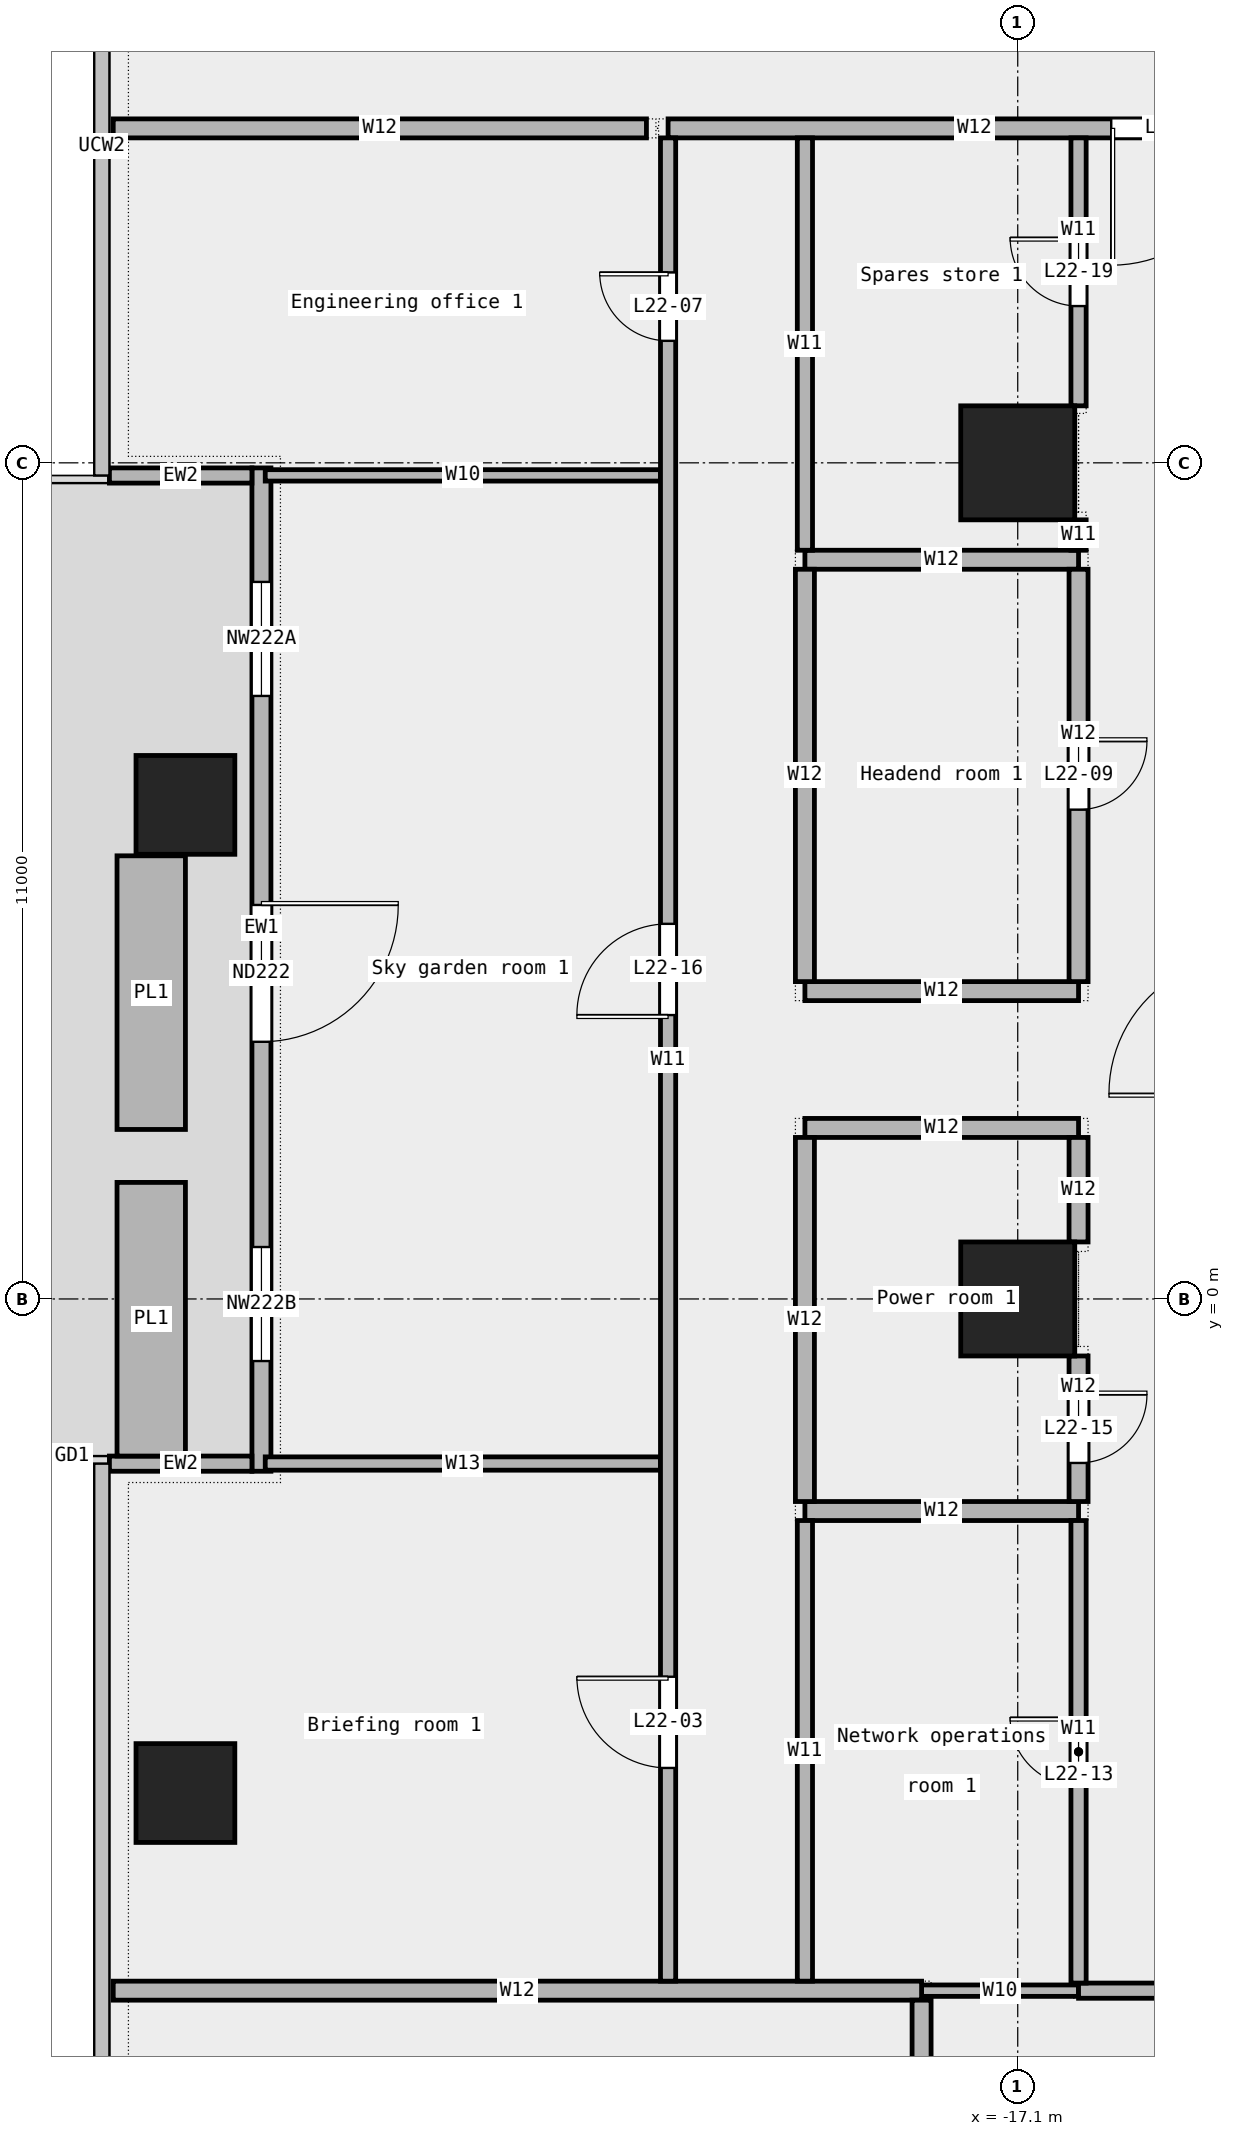
"""IFC4 building model, lengths in metres.
Left out: names, types, materials, properties, quantities, classifications, styles, units other than length and angle.
Written with IfcOpenShell. Run it as: python <this file> out.ifc"""

import sys

from ifc_helpers import new_model, si_unit, direction, frame, frame_2d, origin, origin_2d, place, context, subcontext, project, spatial, rectangle, extrude, element, fill, save


model = new_model("IFC4")
c1 = context("Model", 3, precision=1e-05, world=origin(), true_north=direction((0.0, 1.0)))
c2 = subcontext(c1, "Body", "Model", "MODEL_VIEW")
j1 = project(units=[si_unit("LENGTHUNIT", "METRE"), si_unit("PLANEANGLEUNIT", "RADIAN")], contexts=[c1])
p1 = place(None, origin())
s1 = spatial("IfcSite", under=j1, at=p1, CompositionType="ELEMENT")
p2 = place(p1, origin())
s2 = spatial("IfcBuilding", under=s1, at=p2, CompositionType="ELEMENT")
p3 = place(p2, frame((0.0, 0.0, 112.6)))
s3 = spatial("IfcBuildingStorey", under=s2, at=p3, CompositionType="ELEMENT", Elevation=112.6)
for number, where, z_axis, x_axis in (
    (1, (-28.05, 6.5, 0.0), (0.0, 0.0, 1.0), (1.0, 0.0, 0.0)),
    (2, (-28.05, -6.5, 0.0), (0.0, 0.0, 1.0), (1.0, 0.0, 0.0)),
):
    element("IfcColumn", number, at=place(p3, frame(where, z_axis=z_axis, x_axis=x_axis)), inside=s3, PredefinedType="COLUMN", context=c2, shape_type="SweptSolid", body=[
        extrude(rectangle(XDim=1.3, YDim=1.3, at=origin_2d()), origin(), (0.0, 0.0, 1.0), 4.05),
    ])
for number, where, z_axis, x_axis in (
    (3, (-17.1, 0.0, 0.0), (0.0, 0.0, 1.0), (1.0, 0.0, 0.0)),
    (4, (-17.1, 11.0, 0.0), (0.0, 0.0, 1.0), (1.0, 0.0, 0.0)),
):
    element("IfcColumn", number, at=place(p3, frame(where, z_axis=z_axis, x_axis=x_axis)), inside=s3, PredefinedType="COLUMN", context=c2, shape_type="SweptSolid", body=[
        extrude(rectangle(XDim=1.5, YDim=1.5, at=origin_2d()), origin(), (0.0, 0.0, 1.0), 4.05),
    ])
p4 = place(p3, frame((-27.05, 10.933, 0.0), z_axis=(0.0, 0.0, 1.0), x_axis=(0.0, -1.0, 0.0)))
e5 = element("IfcWall", 5, at=p4, inside=s3, PredefinedType="STANDARD", context=c2, shape_type="SweptSolid", body=[
    extrude(rectangle(XDim=13.2, YDim=0.25, at=frame_2d((6.6, 0.0))), origin(), (0.0, 0.0, 1.0), 4.05),
])
p5 = place(p4, frame((1.5, 0.0, 0.45)))
e6 = element("IfcOpeningElement", 6, at=p5, cuts=e5, PredefinedType="OPENING", context=c2, shape_type="SweptSolid", body=[
    extrude(rectangle(XDim=1.5, YDim=3.0, at=frame_2d((0.75, 1.5))), frame((0.0, 0.137, 0.0), z_axis=(0.0, -1.0, 0.0), x_axis=(1.0, 0.0, 0.0)), (0.0, 0.0, 1.0), 0.274),
])
p6 = place(p4, frame((5.75, 0.0, 0.0)))
e7 = element("IfcOpeningElement", 7, at=p6, cuts=e5, PredefinedType="OPENING", context=c2, shape_type="SweptSolid", body=[
    extrude(rectangle(XDim=1.8, YDim=2.4, at=frame_2d((0.9, 1.2))), frame((0.0, 0.137, 0.0), z_axis=(0.0, -1.0, 0.0), x_axis=(1.0, 0.0, 0.0)), (0.0, 0.0, 1.0), 0.274),
])
p7 = place(p4, frame((10.25, 0.0, 0.45)))
e8 = element("IfcOpeningElement", 8, at=p7, cuts=e5, PredefinedType="OPENING", context=c2, shape_type="SweptSolid", body=[
    extrude(rectangle(XDim=1.5, YDim=3.0, at=frame_2d((0.75, 1.5))), frame((0.0, 0.137, 0.0), z_axis=(0.0, -1.0, 0.0), x_axis=(1.0, 0.0, 0.0)), (0.0, 0.0, 1.0), 0.274),
])
for number, where, z_axis, x_axis in (
    (9, (-29.05, 10.833, 0.0), (0.0, 0.0, 1.0), (1.0, 0.0, 0.0)),
    (10, (-29.05, -2.167, 0.0), (0.0, 0.0, 1.0), (1.0, 0.0, 0.0)),
):
    element("IfcWall", number, at=place(p3, frame(where, z_axis=z_axis, x_axis=x_axis)), inside=s3, PredefinedType="STANDARD", context=c2, shape_type="SweptSolid", body=[
        extrude(rectangle(XDim=1.875, YDim=0.2, at=frame_2d((0.938, 0.0))), origin(), (0.0, 0.0, 1.0), 4.05),
    ])
for number, where, z_axis, x_axis in (
    (11, (-28.5, 5.83, 0.0), (0.0, 0.0, 1.0), (0.0, -1.0, 0.0)),
    (12, (-28.5, 1.533, 0.0), (0.0, 0.0, 1.0), (0.0, -1.0, 0.0)),
):
    element("IfcWall", number, at=place(p3, frame(where, z_axis=z_axis, x_axis=x_axis)), inside=s3, PredefinedType="STANDARD", context=c2, shape_type="SweptSolid", body=[
        extrude(rectangle(XDim=3.6, YDim=0.9, at=frame_2d((1.8, 0.0))), origin(), (0.0, 0.0, 1.0), 0.7),
    ])
p8 = place(p3, frame((-18.365, -9.1, 0.0), z_axis=(0.0, 0.0, 1.0), x_axis=(1.0, 0.0, 0.0)))
e13 = element("IfcWall", 13, at=p8, inside=s3, PredefinedType="PARTITIONING", context=c2, shape_type="SweptSolid", body=[
    extrude(rectangle(XDim=2.065, YDim=0.15, at=frame_2d((1.032, 0.0))), origin(), (0.0, 0.0, 1.0), 4.05),
])
p9 = place(p3, frame((-16.3, -9.1, 0.0), z_axis=(0.0, 0.0, 1.0), x_axis=(1.0, 0.0, 0.0)))
e14 = element("IfcWall", 14, at=p9, inside=s3, PredefinedType="PARTITIONING", context=c2, shape_type="SweptSolid", body=[
    extrude(rectangle(XDim=5.03, YDim=0.2, at=frame_2d((2.515, 0.0))), origin(), (0.0, 0.0, 1.0), 4.05),
])
p10 = place(p3, frame((-29.0, -9.1, 0.0), z_axis=(0.0, 0.0, 1.0), x_axis=(1.0, 0.0, 0.0)))
e15 = element("IfcWall", 15, at=p10, inside=s3, PredefinedType="PARTITIONING", context=c2, shape_type="SweptSolid", body=[
    extrude(rectangle(XDim=10.635, YDim=0.25, at=frame_2d((5.317, 0.0))), origin(), (0.0, 0.0, 1.0), 4.05),
])
p11 = place(p3, frame((-19.9, -2.79, 0.0), z_axis=(0.0, 0.0, 1.0), x_axis=(1.0, 0.0, 0.0)))
e16 = element("IfcWall", 16, at=p11, inside=s3, PredefinedType="PARTITIONING", context=c2, shape_type="SweptSolid", body=[
    extrude(rectangle(XDim=3.6, YDim=0.25, at=frame_2d((1.8, 0.0))), origin(), (0.0, 0.0, 1.0), 4.05),
])
p12 = place(p3, frame((-27.0, -2.165, 0.0), z_axis=(0.0, 0.0, 1.0), x_axis=(1.0, 0.0, 0.0)))
e17 = element("IfcWall", 17, at=p12, inside=s3, PredefinedType="PARTITIONING", context=c2, shape_type="SweptSolid", body=[
    extrude(rectangle(XDim=5.2, YDim=0.175, at=frame_2d((2.6, 0.0))), origin(), (0.0, 0.0, 1.0), 4.05),
])
for number, where, z_axis, x_axis in (
    (18, (-19.9, 2.25, 0.0), (0.0, 0.0, 1.0), (1.0, 0.0, 0.0)),
    (19, (-19.9, 4.05, 0.0), (0.0, 0.0, 1.0), (1.0, 0.0, 0.0)),
    (20, (-19.9, 9.725, 0.0), (0.0, 0.0, 1.0), (1.0, 0.0, 0.0)),
):
    element("IfcWall", number, at=place(p3, frame(where, z_axis=z_axis, x_axis=x_axis)), inside=s3, PredefinedType="PARTITIONING", context=c2, shape_type="SweptSolid", body=[
        extrude(rectangle(XDim=3.6, YDim=0.25, at=frame_2d((1.8, 0.0))), origin(), (0.0, 0.0, 1.0), 4.05),
    ])
p13 = place(p3, frame((-27.0, 10.835, 0.0), z_axis=(0.0, 0.0, 1.0), x_axis=(1.0, 0.0, 0.0)))
e21 = element("IfcWall", 21, at=p13, inside=s3, PredefinedType="PARTITIONING", context=c2, shape_type="SweptSolid", body=[
    extrude(rectangle(XDim=5.2, YDim=0.15, at=frame_2d((2.6, 0.0))), origin(), (0.0, 0.0, 1.0), 4.05),
])
p14 = place(p3, frame((-29.0, 15.4, 0.0), z_axis=(0.0, 0.0, 1.0), x_axis=(1.0, 0.0, 0.0)))
e22 = element("IfcWall", 22, at=p14, inside=s3, PredefinedType="PARTITIONING", context=c2, shape_type="SweptSolid", body=[
    extrude(rectangle(XDim=7.015, YDim=0.25, at=frame_2d((3.507, 0.0))), origin(), (0.0, 0.0, 1.0), 4.05),
])
p15 = place(p3, frame((-21.7, 15.4, 0.0), z_axis=(0.0, 0.0, 1.0), x_axis=(1.0, 0.0, 0.0)))
e23 = element("IfcWall", 23, at=p15, inside=s3, PredefinedType="PARTITIONING", context=c2, shape_type="SweptSolid", body=[
    extrude(rectangle(XDim=8.06, YDim=0.25, at=frame_2d((4.03, 0.0))), origin(), (0.0, 0.0, 1.0), 4.05),
])
p16 = place(p15, frame((5.83, 0.0, 0.0)))
e24 = element("IfcOpeningElement", 24, at=p16, cuts=e23, PredefinedType="OPENING", context=c2, shape_type="SweptSolid", body=[
    extrude(rectangle(XDim=1.8, YDim=2.1, at=frame_2d((0.9, 1.05))), frame((0.0, 0.137, 0.0), z_axis=(0.0, -1.0, 0.0), x_axis=(1.0, 0.0, 0.0)), (0.0, 0.0, 1.0), 0.274),
])
p17 = place(p3, frame((-21.7, -8.975, 0.0), z_axis=(0.0, 0.0, 1.0), x_axis=(0.0, 1.0, 0.0)))
e25 = element("IfcWall", 25, at=p17, inside=s3, PredefinedType="PARTITIONING", context=c2, shape_type="SweptSolid", body=[
    extrude(rectangle(XDim=24.25, YDim=0.2, at=frame_2d((12.125, 0.0))), origin(), (0.0, 0.0, 1.0), 4.05),
])
p18 = place(p17, frame((2.805, 0.0, 0.0)))
e26 = element("IfcOpeningElement", 26, at=p18, cuts=e25, PredefinedType="OPENING", context=c2, shape_type="SweptSolid", body=[
    extrude(rectangle(XDim=1.2, YDim=2.1, at=frame_2d((0.6, 1.05))), frame((0.0, 0.112, 0.0), z_axis=(0.0, -1.0, 0.0), x_axis=(1.0, 0.0, 0.0)), (0.0, 0.0, 1.0), 0.224),
])
p19 = place(p17, frame((21.58, 0.0, 0.0)))
e27 = element("IfcOpeningElement", 27, at=p19, cuts=e25, PredefinedType="OPENING", context=c2, shape_type="SweptSolid", body=[
    extrude(rectangle(XDim=0.9, YDim=2.1, at=frame_2d((0.45, 1.05))), frame((0.0, 0.112, 0.0), z_axis=(0.0, -1.0, 0.0), x_axis=(1.0, 0.0, 0.0)), (0.0, 0.0, 1.0), 0.224),
])
p20 = place(p17, frame((12.71, 0.0, 0.0)))
e28 = element("IfcOpeningElement", 28, at=p20, cuts=e25, PredefinedType="OPENING", context=c2, shape_type="SweptSolid", body=[
    extrude(rectangle(XDim=1.2, YDim=2.1, at=frame_2d((0.6, 1.05))), frame((0.0, 0.112, 0.0), z_axis=(0.0, -1.0, 0.0), x_axis=(1.0, 0.0, 0.0)), (0.0, 0.0, 1.0), 0.224),
])
p21 = place(p3, frame((-19.9, -8.975, 0.0), z_axis=(0.0, 0.0, 1.0), x_axis=(0.0, 1.0, 0.0)))
e29 = element("IfcWall", 29, at=p21, inside=s3, PredefinedType="PARTITIONING", context=c2, shape_type="SweptSolid", body=[
    extrude(rectangle(XDim=6.06, YDim=0.2, at=frame_2d((3.03, 0.0))), origin(), (0.0, 0.0, 1.0), 4.05),
])
p22 = place(p3, frame((-19.9, 9.85, 0.0), z_axis=(0.0, 0.0, 1.0), x_axis=(0.0, 1.0, 0.0)))
e30 = element("IfcWall", 30, at=p22, inside=s3, PredefinedType="PARTITIONING", context=c2, shape_type="SweptSolid", body=[
    extrude(rectangle(XDim=5.425, YDim=0.2, at=frame_2d((2.712, 0.0))), origin(), (0.0, 0.0, 1.0), 4.05),
])
p23 = place(p3, frame((-19.9, -2.665, 0.0), z_axis=(0.0, 0.0, 1.0), x_axis=(0.0, 1.0, 0.0)))
e31 = element("IfcWall", 31, at=p23, inside=s3, PredefinedType="PARTITIONING", context=c2, shape_type="SweptSolid", body=[
    extrude(rectangle(XDim=4.79, YDim=0.25, at=frame_2d((2.395, 0.0))), origin(), (0.0, 0.0, 1.0), 4.05),
])
p24 = place(p3, frame((-19.9, 4.175, 0.0), z_axis=(0.0, 0.0, 1.0), x_axis=(0.0, 1.0, 0.0)))
e32 = element("IfcWall", 32, at=p24, inside=s3, PredefinedType="PARTITIONING", context=c2, shape_type="SweptSolid", body=[
    extrude(rectangle(XDim=5.425, YDim=0.25, at=frame_2d((2.712, 0.0))), origin(), (0.0, 0.0, 1.0), 4.05),
])
p25 = place(p3, frame((-18.365, -14.825, 0.0), z_axis=(0.0, 0.0, 1.0), x_axis=(0.0, 1.0, 0.0)))
e33 = element("IfcWall", 33, at=p25, inside=s3, PredefinedType="PARTITIONING", context=c2, shape_type="SweptSolid", body=[
    extrude(rectangle(XDim=5.6, YDim=0.25, at=frame_2d((2.8, 0.0))), origin(), (0.0, 0.0, 1.0), 4.05),
])
p26 = place(p3, frame((-16.3, -9.0, 0.0), z_axis=(0.0, 0.0, 1.0), x_axis=(0.0, 1.0, 0.0)))
e34 = element("IfcWall", 34, at=p26, inside=s3, PredefinedType="PARTITIONING", context=c2, shape_type="SweptSolid", body=[
    extrude(rectangle(XDim=6.085, YDim=0.2, at=frame_2d((3.042, 0.0))), origin(), (0.0, 0.0, 1.0), 4.05),
])
p27 = place(p26, frame((2.593, 0.0, 0.0)))
e35 = element("IfcOpeningElement", 35, at=p27, cuts=e34, PredefinedType="OPENING", context=c2, shape_type="SweptSolid", body=[
    extrude(rectangle(XDim=0.9, YDim=2.1, at=frame_2d((0.45, 1.05))), frame((0.0, 0.112, 0.0), z_axis=(0.0, -1.0, 0.0), x_axis=(1.0, 0.0, 0.0)), (0.0, 0.0, 1.0), 0.224),
])
p28 = place(p3, frame((-16.3, 9.85, 0.0), z_axis=(0.0, 0.0, 1.0), x_axis=(0.0, 1.0, 0.0)))
e36 = element("IfcWall", 36, at=p28, inside=s3, PredefinedType="PARTITIONING", context=c2, shape_type="SweptSolid", body=[
    extrude(rectangle(XDim=0.4, YDim=0.2, at=frame_2d((0.2, 0.0))), origin(), (0.0, 0.0, 1.0), 4.05),
])
p29 = place(p3, frame((-16.3, 11.75, 0.0), z_axis=(0.0, 0.0, 1.0), x_axis=(0.0, 1.0, 0.0)))
e37 = element("IfcWall", 37, at=p29, inside=s3, PredefinedType="PARTITIONING", context=c2, shape_type="SweptSolid", body=[
    extrude(rectangle(XDim=3.525, YDim=0.2, at=frame_2d((1.762, 0.0))), origin(), (0.0, 0.0, 1.0), 4.05),
])
p30 = place(p29, frame((1.312, 0.0, 0.0)))
e38 = element("IfcOpeningElement", 38, at=p30, cuts=e37, PredefinedType="OPENING", context=c2, shape_type="SweptSolid", body=[
    extrude(rectangle(XDim=0.9, YDim=2.1, at=frame_2d((0.45, 1.05))), frame((0.0, 0.112, 0.0), z_axis=(0.0, -1.0, 0.0), x_axis=(1.0, 0.0, 0.0)), (0.0, 0.0, 1.0), 0.224),
])
p31 = place(p3, frame((-16.3, -2.665, 0.0), z_axis=(0.0, 0.0, 1.0), x_axis=(0.0, 1.0, 0.0)))
e39 = element("IfcWall", 39, at=p31, inside=s3, PredefinedType="PARTITIONING", context=c2, shape_type="SweptSolid", body=[
    extrude(rectangle(XDim=1.915, YDim=0.25, at=frame_2d((0.958, 0.0))), origin(), (0.0, 0.0, 1.0), 4.05),
])
p32 = place(p31, frame((0.508, 0.0, 0.0)))
e40 = element("IfcOpeningElement", 40, at=p32, cuts=e39, PredefinedType="OPENING", context=c2, shape_type="SweptSolid", body=[
    extrude(rectangle(XDim=0.9, YDim=2.1, at=frame_2d((0.45, 1.05))), frame((0.0, 0.137, 0.0), z_axis=(0.0, -1.0, 0.0), x_axis=(1.0, 0.0, 0.0)), (0.0, 0.0, 1.0), 0.274),
])
p33 = place(p3, frame((-16.3, 0.75, 0.0), z_axis=(0.0, 0.0, 1.0), x_axis=(0.0, 1.0, 0.0)))
e41 = element("IfcWall", 41, at=p33, inside=s3, PredefinedType="PARTITIONING", context=c2, shape_type="SweptSolid", body=[
    extrude(rectangle(XDim=1.375, YDim=0.25, at=frame_2d((0.688, 0.0))), origin(), (0.0, 0.0, 1.0), 4.05),
])
p34 = place(p3, frame((-16.3, 4.175, 0.0), z_axis=(0.0, 0.0, 1.0), x_axis=(0.0, 1.0, 0.0)))
e42 = element("IfcWall", 42, at=p34, inside=s3, PredefinedType="PARTITIONING", context=c2, shape_type="SweptSolid", body=[
    extrude(rectangle(XDim=5.425, YDim=0.25, at=frame_2d((2.712, 0.0))), origin(), (0.0, 0.0, 1.0), 4.05),
])
p35 = place(p34, frame((2.262, 0.0, 0.0)))
e43 = element("IfcOpeningElement", 43, at=p35, cuts=e42, PredefinedType="OPENING", context=c2, shape_type="SweptSolid", body=[
    extrude(rectangle(XDim=0.9, YDim=2.1, at=frame_2d((0.45, 1.05))), frame((0.0, 0.137, 0.0), z_axis=(0.0, -1.0, 0.0), x_axis=(1.0, 0.0, 0.0)), (0.0, 0.0, 1.0), 0.274),
])
p36 = place(p5, origin())
e44 = element("IfcWindow", 44, at=p36, inside=s3, PartitioningType="SINGLE_PANEL", PredefinedType="WINDOW", context=c2, shape_type="SweptSolid", body=[
    extrude(rectangle(XDim=1.5, YDim=3.0, at=frame_2d((0.75, 1.5))), frame((0.0, 0.03, 0.0), z_axis=(0.0, -1.0, 0.0), x_axis=(1.0, 0.0, 0.0)), (0.0, 0.0, 1.0), 0.06),
])
fill(e6, e44)
p37 = place(p6, origin())
e45 = element("IfcDoor", 45, at=p37, inside=s3, OperationType="DOUBLE_DOOR_SINGLE_SWING", PredefinedType="DOOR", context=c2, shape_type="SweptSolid", body=[
    extrude(rectangle(XDim=1.8, YDim=2.4, at=frame_2d((0.9, 1.2))), frame((0.0, 0.025, 0.0), z_axis=(0.0, -1.0, 0.0), x_axis=(1.0, 0.0, 0.0)), (0.0, 0.0, 1.0), 0.05),
])
fill(e7, e45)
p38 = place(p7, origin())
e46 = element("IfcWindow", 46, at=p38, inside=s3, PartitioningType="SINGLE_PANEL", PredefinedType="WINDOW", context=c2, shape_type="SweptSolid", body=[
    extrude(rectangle(XDim=1.5, YDim=3.0, at=frame_2d((0.75, 1.5))), frame((0.0, 0.03, 0.0), z_axis=(0.0, -1.0, 0.0), x_axis=(1.0, 0.0, 0.0)), (0.0, 0.0, 1.0), 0.06),
])
fill(e8, e46)
p39 = place(p18, origin())
e47 = element("IfcDoor", 47, at=p39, inside=s3, OperationType="SINGLE_SWING_RIGHT", PredefinedType="DOOR", context=c2, shape_type="SweptSolid", body=[
    extrude(rectangle(XDim=1.2, YDim=2.1, at=frame_2d((0.6, 1.05))), frame((0.0, 0.025, 0.0), z_axis=(0.0, -1.0, 0.0), x_axis=(1.0, 0.0, 0.0)), (0.0, 0.0, 1.0), 0.05),
])
fill(e26, e47)
p40 = place(p19, origin())
e48 = element("IfcDoor", 48, at=p40, inside=s3, OperationType="SINGLE_SWING_RIGHT", PredefinedType="DOOR", context=c2, shape_type="SweptSolid", body=[
    extrude(rectangle(XDim=0.9, YDim=2.1, at=frame_2d((0.45, 1.05))), frame((0.0, 0.025, 0.0), z_axis=(0.0, -1.0, 0.0), x_axis=(1.0, 0.0, 0.0)), (0.0, 0.0, 1.0), 0.05),
])
fill(e27, e48)
p41 = place(p35, origin())
e49 = element("IfcDoor", 49, at=p41, inside=s3, OperationType="SINGLE_SWING_LEFT", PredefinedType="DOOR", context=c2, shape_type="SweptSolid", body=[
    extrude(rectangle(XDim=0.9, YDim=2.1, at=frame_2d((0.45, 1.05))), frame((0.0, 0.025, 0.0), z_axis=(0.0, -1.0, 0.0), x_axis=(1.0, 0.0, 0.0)), (0.0, 0.0, 1.0), 0.05),
])
fill(e43, e49)
p42 = place(p16, origin())
e50 = element("IfcDoor", 50, at=p42, inside=s3, OperationType="DOUBLE_DOOR_SINGLE_SWING", PredefinedType="DOOR", context=c2, shape_type="SweptSolid", body=[
    extrude(rectangle(XDim=1.8, YDim=2.1, at=frame_2d((0.9, 1.05))), frame((0.0, 0.025, 0.0), z_axis=(0.0, -1.0, 0.0), x_axis=(1.0, 0.0, 0.0)), (0.0, 0.0, 1.0), 0.05),
])
fill(e24, e50)
p43 = place(p27, origin())
e51 = element("IfcDoor", 51, at=p43, inside=s3, OperationType="SINGLE_SWING_RIGHT", PredefinedType="DOOR", context=c2, shape_type="SweptSolid", body=[
    extrude(rectangle(XDim=0.9, YDim=2.1, at=frame_2d((0.45, 1.05))), frame((0.0, 0.025, 0.0), z_axis=(0.0, -1.0, 0.0), x_axis=(1.0, 0.0, 0.0)), (0.0, 0.0, 1.0), 0.05),
])
fill(e35, e51)
p44 = place(p32, origin())
e52 = element("IfcDoor", 52, at=p44, inside=s3, OperationType="SINGLE_SWING_LEFT", PredefinedType="DOOR", context=c2, shape_type="SweptSolid", body=[
    extrude(rectangle(XDim=0.9, YDim=2.1, at=frame_2d((0.45, 1.05))), frame((0.0, 0.025, 0.0), z_axis=(0.0, -1.0, 0.0), x_axis=(1.0, 0.0, 0.0)), (0.0, 0.0, 1.0), 0.05),
])
fill(e40, e52)
p45 = place(p20, origin())
e53 = element("IfcDoor", 53, at=p45, inside=s3, OperationType="SINGLE_SWING_LEFT", PredefinedType="DOOR", context=c2, shape_type="SweptSolid", body=[
    extrude(rectangle(XDim=1.2, YDim=2.1, at=frame_2d((0.6, 1.05))), frame((0.0, 0.025, 0.0), z_axis=(0.0, -1.0, 0.0), x_axis=(1.0, 0.0, 0.0)), (0.0, 0.0, 1.0), 0.05),
])
fill(e28, e53)
p46 = place(p30, origin())
e54 = element("IfcDoor", 54, at=p46, inside=s3, OperationType="SINGLE_SWING_RIGHT", PredefinedType="DOOR", context=c2, shape_type="SweptSolid", body=[
    extrude(rectangle(XDim=0.9, YDim=2.1, at=frame_2d((0.45, 1.05))), frame((0.0, 0.025, 0.0), z_axis=(0.0, -1.0, 0.0), x_axis=(1.0, 0.0, 0.0)), (0.0, 0.0, 1.0), 0.05),
])
fill(e38, e54)
save(model, sys.argv[1])
